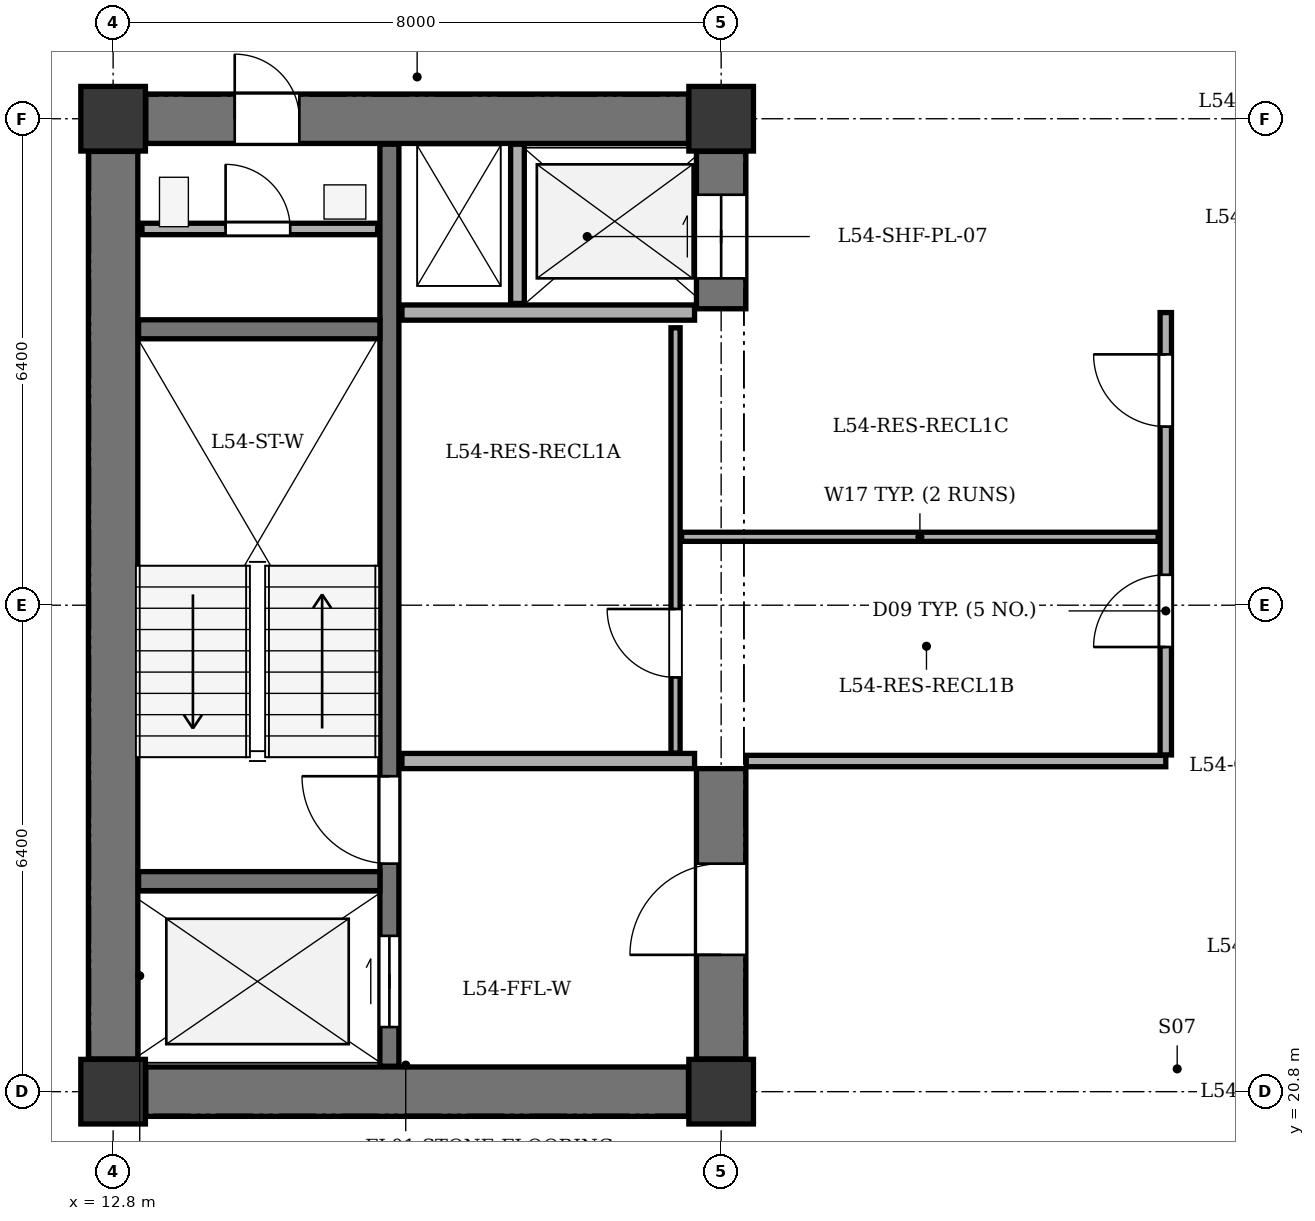
"""IFC4 building model, lengths in metres.
Left out: names, types, materials, properties, quantities, classifications, styles, units other than length and angle.
Written with IfcOpenShell. Run it as: python <this file> out.ifc"""

import sys

from ifc_helpers import new_model, si_unit, direction, frame, frame_2d, origin, origin_2d, place, context, subcontext, project, spatial, rectangle, extrude, element, fill, save


model = new_model("IFC4")
c1 = context("Model", 3, precision=1e-05, world=origin(), true_north=direction((0.0, 1.0)))
c2 = subcontext(c1, "Body", "Model", "MODEL_VIEW")
j1 = project(units=[si_unit("LENGTHUNIT", "METRE"), si_unit("PLANEANGLEUNIT", "RADIAN")], contexts=[c1])
p1 = place(None, origin())
s1 = spatial("IfcSite", under=j1, at=p1, CompositionType="ELEMENT")
p2 = place(p1, origin())
s2 = spatial("IfcBuilding", under=s1, at=p2, CompositionType="ELEMENT")
p3 = place(p2, frame((0.0, 0.0, 210.9)))
s3 = spatial("IfcBuildingStorey", under=s2, at=p3, CompositionType="ELEMENT", Elevation=210.9)
for number, where, z_axis, x_axis in (
    (1, (12.8, 20.8, 0.0), (0.0, 0.0, 1.0), (1.0, 0.0, 0.0)),
    (2, (20.8, 20.8, 0.0), (0.0, 0.0, 1.0), (1.0, 0.0, 0.0)),
    (3, (12.8, 33.6, 0.0), (0.0, 0.0, 1.0), (1.0, 0.0, 0.0)),
    (4, (20.8, 33.6, 0.0), (0.0, 0.0, 1.0), (1.0, 0.0, 0.0)),
):
    element("IfcColumn", number, at=place(p3, frame(where, z_axis=z_axis, x_axis=x_axis)), inside=s3, PredefinedType="COLUMN", context=c2, shape_type="SweptSolid", body=[
        extrude(rectangle(XDim=0.85, YDim=0.85, at=origin_2d()), origin(), (0.0, 0.0, 1.0), 3.4),
    ])
p4 = place(p3, frame((12.8, 21.23, 0.0), z_axis=(0.0, 0.0, 1.0), x_axis=(0.0, 1.0, 0.0)))
e5 = element("IfcWall", 5, at=p4, inside=s3, PredefinedType="SHEAR", context=c2, shape_type="SweptSolid", body=[
    extrude(rectangle(XDim=11.94, YDim=0.65, at=frame_2d((5.97, 0.0))), origin(), (0.0, 0.0, 1.0), 3.1),
])
p5 = place(p3, frame((13.23, 20.8, 0.0), z_axis=(0.0, 0.0, 1.0), x_axis=(1.0, 0.0, 0.0)))
e6 = element("IfcWall", 6, at=p5, inside=s3, PredefinedType="SHEAR", context=c2, shape_type="SweptSolid", body=[
    extrude(rectangle(XDim=7.14, YDim=0.65, at=frame_2d((3.57, 0.0))), origin(), (0.0, 0.0, 1.0), 3.1),
])
p6 = place(p3, frame((13.23, 33.6, 0.0), z_axis=(0.0, 0.0, 1.0), x_axis=(1.0, 0.0, 0.0)))
e7 = element("IfcWall", 7, at=p6, inside=s3, PredefinedType="SHEAR", context=c2, shape_type="SweptSolid", body=[
    extrude(rectangle(XDim=7.14, YDim=0.65, at=frame_2d((3.57, 0.0))), origin(), (0.0, 0.0, 1.0), 3.1),
])
p7 = place(p6, frame((1.17, 0.0, 0.0)))
e8 = element("IfcOpeningElement", 8, at=p7, cuts=e7, PredefinedType="OPENING", context=c2, shape_type="SweptSolid", body=[
    extrude(rectangle(XDim=0.85, YDim=2.02, at=frame_2d((0.425, 1.01))), frame((0.0, 0.335, 0.0), z_axis=(0.0, -1.0, 0.0), x_axis=(1.0, 0.0, 0.0)), (0.0, 0.0, 1.0), 0.67),
])
p8 = place(p3, frame((20.8, 21.23, 0.0), z_axis=(0.0, 0.0, 1.0), x_axis=(0.0, 1.0, 0.0)))
e9 = element("IfcWall", 9, at=p8, inside=s3, PredefinedType="SHEAR", context=c2, shape_type="SweptSolid", body=[
    extrude(rectangle(XDim=3.82, YDim=0.65, at=frame_2d((1.91, 0.0))), origin(), (0.0, 0.0, 1.0), 3.1),
])
p9 = place(p8, frame((1.37, 0.0, 0.0)))
e10 = element("IfcOpeningElement", 10, at=p9, cuts=e9, PredefinedType="OPENING", context=c2, shape_type="SweptSolid", body=[
    extrude(rectangle(XDim=1.2, YDim=2.15, at=frame_2d((0.6, 1.075))), frame((0.0, 0.335, 0.0), z_axis=(0.0, -1.0, 0.0), x_axis=(1.0, 0.0, 0.0)), (0.0, 0.0, 1.0), 0.67),
])
p10 = place(p3, frame((20.8, 31.1, 0.0), z_axis=(0.0, 0.0, 1.0), x_axis=(0.0, 1.0, 0.0)))
e11 = element("IfcWall", 11, at=p10, inside=s3, PredefinedType="SHEAR", context=c2, shape_type="SweptSolid", body=[
    extrude(rectangle(XDim=2.07, YDim=0.65, at=frame_2d((1.035, 0.0))), origin(), (0.0, 0.0, 1.0), 3.1),
])
p11 = place(p10, frame((0.4, 0.0, 0.0)))
e12 = element("IfcOpeningElement", 12, at=p11, cuts=e11, PredefinedType="OPENING", context=c2, shape_type="SweptSolid", body=[
    extrude(rectangle(XDim=1.1, YDim=2.1, at=frame_2d((0.55, 1.05))), frame((0.0, 0.335, 0.0), z_axis=(0.0, -1.0, 0.0), x_axis=(1.0, 0.0, 0.0)), (0.0, 0.0, 1.0), 0.67),
])
p12 = place(p3, frame((16.435, 21.135, 0.0), z_axis=(0.0, 0.0, 1.0), x_axis=(0.0, 1.0, 0.0)))
e13 = element("IfcWall", 13, at=p12, inside=s3, PredefinedType="SHEAR", context=c2, shape_type="SweptSolid", body=[
    extrude(rectangle(XDim=12.13, YDim=0.25, at=frame_2d((6.065, 0.0))), origin(), (0.0, 0.0, 1.0), 3.1),
])
p13 = place(p12, frame((0.515, 0.0, 0.0)))
e14 = element("IfcOpeningElement", 14, at=p13, cuts=e13, PredefinedType="OPENING", context=c2, shape_type="SweptSolid", body=[
    extrude(rectangle(XDim=1.2, YDim=2.15, at=frame_2d((0.6, 1.075))), frame((0.0, 0.135, 0.0), z_axis=(0.0, -1.0, 0.0), x_axis=(1.0, 0.0, 0.0)), (0.0, 0.0, 1.0), 0.27),
])
p14 = place(p12, frame((2.665, 0.0, 0.0)))
e15 = element("IfcOpeningElement", 15, at=p14, cuts=e13, PredefinedType="OPENING", context=c2, shape_type="SweptSolid", body=[
    extrude(rectangle(XDim=1.15, YDim=2.15, at=frame_2d((0.575, 1.075))), frame((0.0, 0.135, 0.0), z_axis=(0.0, -1.0, 0.0), x_axis=(1.0, 0.0, 0.0)), (0.0, 0.0, 1.0), 0.27),
])
for number, where, z_axis, x_axis in (
    (16, (13.135, 23.57, 0.0), (0.0, 0.0, 1.0), (1.0, 0.0, 0.0)),
    (17, (13.135, 30.83, 0.0), (0.0, 0.0, 1.0), (1.0, 0.0, 0.0)),
):
    element("IfcWall", number, at=place(p3, frame(where, z_axis=z_axis, x_axis=x_axis)), inside=s3, PredefinedType="SHEAR", context=c2, shape_type="SweptSolid", body=[
        extrude(rectangle(XDim=3.175, YDim=0.25, at=frame_2d((1.587, 0.0))), origin(), (0.0, 0.0, 1.0), 3.1),
    ])
for number, where, z_axis, x_axis in (
    (18, (16.6, 25.15, 0.0), (0.0, 0.0, 1.0), (1.0, 0.0, 0.0)),
    (19, (16.6, 31.05, 0.0), (0.0, 0.0, 1.0), (1.0, 0.0, 0.0)),
):
    element("IfcWall", number, at=place(p3, frame(where, z_axis=z_axis, x_axis=x_axis)), inside=s3, PredefinedType="SOLIDWALL", context=c2, shape_type="SweptSolid", body=[
        extrude(rectangle(XDim=3.85, YDim=0.2, at=frame_2d((1.925, 0.0))), origin(), (0.0, 0.0, 1.0), 3.1),
    ])
p15 = place(p3, frame((18.12, 31.17, 0.0), z_axis=(0.0, 0.0, 1.0), x_axis=(0.0, 1.0, 0.0)))
e20 = element("IfcWall", 20, at=p15, inside=s3, PredefinedType="PARTITIONING", context=c2, shape_type="SweptSolid", body=[
    extrude(rectangle(XDim=2.095, YDim=0.18, at=frame_2d((1.047, 0.0))), origin(), (0.0, 0.0, 1.0), 3.1),
])
p16 = place(p3, frame((13.18, 32.15, 0.0), z_axis=(0.0, 0.0, 1.0), x_axis=(1.0, 0.0, 0.0)))
e21 = element("IfcWall", 21, at=p16, inside=s3, PredefinedType="PARTITIONING", context=c2, shape_type="SweptSolid", body=[
    extrude(rectangle(XDim=3.1, YDim=0.15, at=frame_2d((1.55, 0.0))), origin(), (0.0, 0.0, 1.0), 3.1),
])
p17 = place(p16, frame((1.1, 0.0, 0.0)))
e22 = element("IfcOpeningElement", 22, at=p17, cuts=e21, PredefinedType="OPENING", context=c2, shape_type="SweptSolid", body=[
    extrude(rectangle(XDim=0.85, YDim=2.02, at=frame_2d((0.425, 1.01))), frame((0.0, 0.085, 0.0), z_axis=(0.0, -1.0, 0.0), x_axis=(1.0, 0.0, 0.0)), (0.0, 0.0, 1.0), 0.17),
])
p18 = place(p3, frame((21.13, 25.15, 0.0), z_axis=(0.0, 0.0, 1.0), x_axis=(1.0, 0.0, 0.0)))
e23 = element("IfcWall", 23, at=p18, inside=s3, PredefinedType="PARTITIONING", context=c2, shape_type="SweptSolid", body=[
    extrude(rectangle(XDim=5.52, YDim=0.15, at=frame_2d((2.76, 0.0))), origin(), (0.0, 0.0, 1.0), 3.1),
])
p19 = place(p3, frame((26.65, 25.23, 0.0), z_axis=(0.0, 0.0, 1.0), x_axis=(0.0, 1.0, 0.0)))
e24 = element("IfcWall", 24, at=p19, inside=s3, PredefinedType="PARTITIONING", context=c2, shape_type="SweptSolid", body=[
    extrude(rectangle(XDim=5.82, YDim=0.15, at=frame_2d((2.91, 0.0))), origin(), (0.0, 0.0, 1.0), 3.1),
])
p20 = place(p19, frame((1.42, 0.0, 0.0)))
e25 = element("IfcOpeningElement", 25, at=p20, cuts=e24, PredefinedType="OPENING", context=c2, shape_type="SweptSolid", body=[
    extrude(rectangle(XDim=0.95, YDim=2.1, at=frame_2d((0.475, 1.05))), frame((0.0, 0.085, 0.0), z_axis=(0.0, -1.0, 0.0), x_axis=(1.0, 0.0, 0.0)), (0.0, 0.0, 1.0), 0.17),
])
p21 = place(p19, frame((4.32, 0.0, 0.0)))
e26 = element("IfcOpeningElement", 26, at=p21, cuts=e24, PredefinedType="OPENING", context=c2, shape_type="SweptSolid", body=[
    extrude(rectangle(XDim=0.95, YDim=2.1, at=frame_2d((0.475, 1.05))), frame((0.0, 0.085, 0.0), z_axis=(0.0, -1.0, 0.0), x_axis=(1.0, 0.0, 0.0)), (0.0, 0.0, 1.0), 0.17),
])
p22 = place(p3, frame((20.2, 25.255, 0.0), z_axis=(0.0, 0.0, 1.0), x_axis=(0.0, 1.0, 0.0)))
e27 = element("IfcWall", 27, at=p22, inside=s3, PredefinedType="PARTITIONING", context=c2, shape_type="SweptSolid", body=[
    extrude(rectangle(XDim=5.595, YDim=0.12, at=frame_2d((2.798, 0.0))), origin(), (0.0, 0.0, 1.0), 3.1),
])
p23 = place(p22, frame((0.995, 0.0, 0.0)))
e28 = element("IfcOpeningElement", 28, at=p23, cuts=e27, PredefinedType="OPENING", context=c2, shape_type="SweptSolid", body=[
    extrude(rectangle(XDim=0.9, YDim=2.05, at=frame_2d((0.45, 1.025))), frame((0.0, 0.07, 0.0), z_axis=(0.0, -1.0, 0.0), x_axis=(1.0, 0.0, 0.0)), (0.0, 0.0, 1.0), 0.14),
])
p24 = place(p3, frame((20.28, 28.1, 0.0), z_axis=(0.0, 0.0, 1.0), x_axis=(1.0, 0.0, 0.0)))
e29 = element("IfcWall", 29, at=p24, inside=s3, PredefinedType="PARTITIONING", context=c2, shape_type="SweptSolid", body=[
    extrude(rectangle(XDim=6.27, YDim=0.12, at=frame_2d((3.135, 0.0))), origin(), (0.0, 0.0, 1.0), 3.1),
])
p25 = place(p7, origin())
e30 = element("IfcDoor", 30, at=p25, inside=s3, OperationType="SINGLE_SWING_LEFT", PredefinedType="DOOR", context=c2, shape_type="SweptSolid", body=[
    extrude(rectangle(XDim=0.85, YDim=2.02, at=frame_2d((0.425, 1.01))), frame((0.0, 0.025, 0.0), z_axis=(0.0, -1.0, 0.0), x_axis=(1.0, 0.0, 0.0)), (0.0, 0.0, 1.0), 0.05),
])
fill(e8, e30)
p26 = place(p9, origin())
e31 = element("IfcDoor", 31, at=p26, inside=s3, OperationType="SINGLE_SWING_LEFT", PredefinedType="DOOR", context=c2, shape_type="SweptSolid", body=[
    extrude(rectangle(XDim=1.2, YDim=2.15, at=frame_2d((0.6, 1.075))), frame((0.0, 0.025, 0.0), z_axis=(0.0, -1.0, 0.0), x_axis=(1.0, 0.0, 0.0)), (0.0, 0.0, 1.0), 0.05),
])
fill(e10, e31)
p27 = place(p11, origin())
e32 = element("IfcDoor", 32, at=p27, inside=s3, OperationType="DOUBLE_DOOR_SLIDING", PredefinedType="DOOR", context=c2, shape_type="SweptSolid", body=[
    extrude(rectangle(XDim=1.1, YDim=2.1, at=frame_2d((0.55, 1.05))), frame((0.0, 0.025, 0.0), z_axis=(0.0, -1.0, 0.0), x_axis=(1.0, 0.0, 0.0)), (0.0, 0.0, 1.0), 0.05),
])
fill(e12, e32)
p28 = place(p13, origin())
e33 = element("IfcDoor", 33, at=p28, inside=s3, OperationType="DOUBLE_DOOR_SLIDING", PredefinedType="DOOR", context=c2, shape_type="SweptSolid", body=[
    extrude(rectangle(XDim=1.2, YDim=2.15, at=frame_2d((0.6, 1.075))), frame((0.0, 0.025, 0.0), z_axis=(0.0, -1.0, 0.0), x_axis=(1.0, 0.0, 0.0)), (0.0, 0.0, 1.0), 0.05),
])
fill(e14, e33)
p29 = place(p14, origin())
e34 = element("IfcDoor", 34, at=p29, inside=s3, OperationType="SINGLE_SWING_RIGHT", PredefinedType="DOOR", context=c2, shape_type="SweptSolid", body=[
    extrude(rectangle(XDim=1.15, YDim=2.15, at=frame_2d((0.575, 1.075))), frame((0.0, 0.025, 0.0), z_axis=(0.0, -1.0, 0.0), x_axis=(1.0, 0.0, 0.0)), (0.0, 0.0, 1.0), 0.05),
])
fill(e15, e34)
p30 = place(p17, origin())
e35 = element("IfcDoor", 35, at=p30, inside=s3, OperationType="SINGLE_SWING_LEFT", PredefinedType="DOOR", context=c2, shape_type="SweptSolid", body=[
    extrude(rectangle(XDim=0.85, YDim=2.02, at=frame_2d((0.425, 1.01))), frame((0.0, 0.025, 0.0), z_axis=(0.0, -1.0, 0.0), x_axis=(1.0, 0.0, 0.0)), (0.0, 0.0, 1.0), 0.05),
])
fill(e22, e35)
p31 = place(p23, origin())
e36 = element("IfcDoor", 36, at=p31, inside=s3, OperationType="SINGLE_SWING_RIGHT", PredefinedType="DOOR", context=c2, shape_type="SweptSolid", body=[
    extrude(rectangle(XDim=0.9, YDim=2.05, at=frame_2d((0.45, 1.025))), frame((0.0, 0.025, 0.0), z_axis=(0.0, -1.0, 0.0), x_axis=(1.0, 0.0, 0.0)), (0.0, 0.0, 1.0), 0.05),
])
fill(e28, e36)
p32 = place(p20, origin())
e37 = element("IfcDoor", 37, at=p32, inside=s3, OperationType="SINGLE_SWING_LEFT", PredefinedType="DOOR", context=c2, shape_type="SweptSolid", body=[
    extrude(rectangle(XDim=0.95, YDim=2.1, at=frame_2d((0.475, 1.05))), frame((0.0, 0.025, 0.0), z_axis=(0.0, -1.0, 0.0), x_axis=(1.0, 0.0, 0.0)), (0.0, 0.0, 1.0), 0.05),
])
fill(e25, e37)
p33 = place(p21, origin())
e38 = element("IfcDoor", 38, at=p33, inside=s3, OperationType="SINGLE_SWING_RIGHT", PredefinedType="DOOR", context=c2, shape_type="SweptSolid", body=[
    extrude(rectangle(XDim=0.95, YDim=2.1, at=frame_2d((0.475, 1.05))), frame((0.0, 0.025, 0.0), z_axis=(0.0, -1.0, 0.0), x_axis=(1.0, 0.0, 0.0)), (0.0, 0.0, 1.0), 0.05),
])
fill(e26, e38)
save(model, sys.argv[1])
